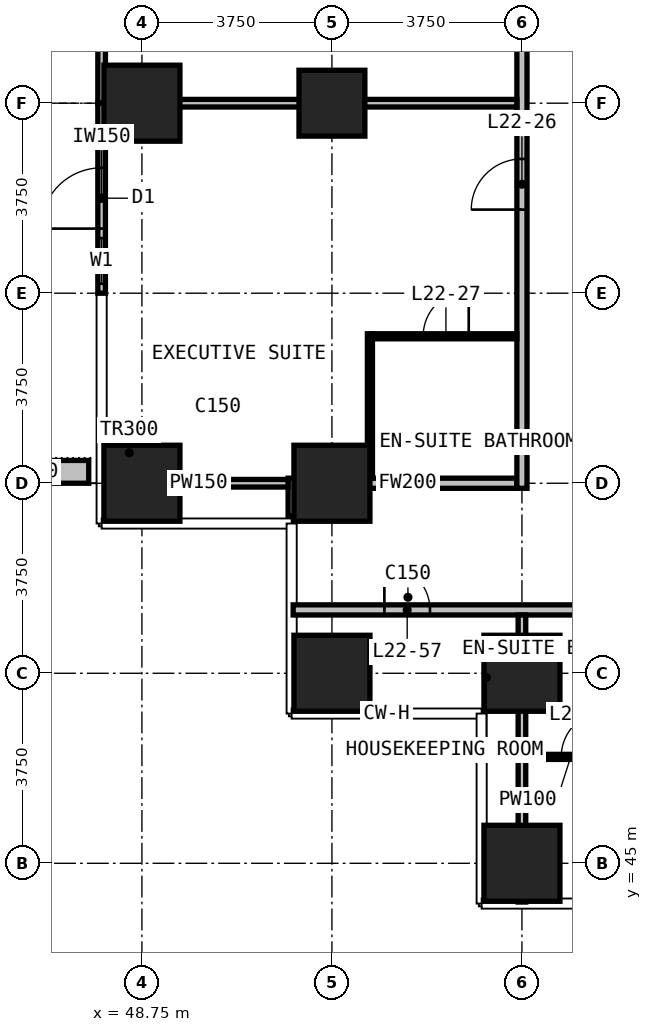
"""IFC4 building model, lengths in metres.
Left out: names, types, materials, properties, quantities, classifications, styles, units other than length and angle.
Written with IfcOpenShell. Run it as: python <this file> out.ifc"""

import sys

from ifc_helpers import new_model, si_unit, direction, frame, frame_2d, origin, origin_2d, place, context, subcontext, project, spatial, rectangle, extrude, element, fill, save


model = new_model("IFC4")
c1 = context("Model", 3, precision=1e-05, world=origin(), true_north=direction((0.0, 1.0)))
c2 = subcontext(c1, "Body", "Model", "MODEL_VIEW")
j1 = project(units=[si_unit("LENGTHUNIT", "METRE"), si_unit("PLANEANGLEUNIT", "RADIAN")], contexts=[c1])
p1 = place(None, origin())
s1 = spatial("IfcSite", under=j1, at=p1, CompositionType="ELEMENT")
p2 = place(p1, origin())
s2 = spatial("IfcBuilding", under=s1, at=p2, CompositionType="ELEMENT")
p3 = place(p2, frame((0.0, 0.0, 92.3)))
s3 = spatial("IfcBuildingStorey", under=s2, at=p3, CompositionType="ELEMENT", Elevation=92.3)
for number, where, z_axis, x_axis in (
    (1, (48.75, 52.5, 0.0), (0.0, 0.0, 1.0), (1.0, 0.0, 0.0)),
    (2, (48.75, 60.0, 0.0), (0.0, 0.0, 1.0), (1.0, 0.0, 0.0)),
    (3, (52.5, 48.75, 0.0), (0.0, 0.0, 1.0), (1.0, 0.0, 0.0)),
    (4, (52.5, 52.5, 0.0), (0.0, 0.0, 1.0), (1.0, 0.0, 0.0)),
):
    element("IfcColumn", number, at=place(p3, frame(where, z_axis=z_axis, x_axis=x_axis)), inside=s3, PredefinedType="COLUMN", context=c2, shape_type="SweptSolid", body=[
        extrude(rectangle(XDim=1.5, YDim=1.5, at=origin_2d()), origin(), (0.0, 0.0, 1.0), 3.3),
    ])
p4 = place(p3, frame((52.5, 60.0, 0.0), z_axis=(0.0, 0.0, 1.0), x_axis=(1.0, 0.0, 0.0)))
e5 = element("IfcColumn", 5, at=p4, inside=s3, PredefinedType="COLUMN", context=c2, shape_type="SweptSolid", body=[
    extrude(rectangle(XDim=1.3, YDim=1.3, at=origin_2d()), origin(), (0.0, 0.0, 1.0), 3.3),
])
for number, where, z_axis, x_axis in (
    (6, (56.25, 45.0, 0.0), (0.0, 0.0, 1.0), (1.0, 0.0, 0.0)),
    (7, (56.25, 48.75, 0.0), (0.0, 0.0, 1.0), (1.0, 0.0, 0.0)),
):
    element("IfcColumn", number, at=place(p3, frame(where, z_axis=z_axis, x_axis=x_axis)), inside=s3, PredefinedType="COLUMN", context=c2, shape_type="SweptSolid", body=[
        extrude(rectangle(XDim=1.5, YDim=1.5, at=origin_2d()), origin(), (0.0, 0.0, 1.0), 3.3),
    ])
p5 = place(p3, frame((47.955, 56.25, 0.0), z_axis=(0.0, 0.0, 1.0), x_axis=(0.0, 1.0, 0.0)))
e8 = element("IfcWall", 8, at=p5, inside=s3, PredefinedType="SOLIDWALL", context=c2, shape_type="SweptSolid", body=[
    extrude(rectangle(XDim=3.75, YDim=0.15, at=frame_2d((1.875, 0.0))), origin(), (0.0, 0.0, 1.0), 3.0),
])
p6 = place(p5, frame((0.188, 0.0, 0.1)))
e9 = element("IfcOpeningElement", 9, at=p6, cuts=e8, PredefinedType="OPENING", context=c2, shape_type="SweptSolid", body=[
    extrude(rectangle(XDim=0.9, YDim=2.4, at=frame_2d((0.45, 1.2))), frame((0.0, 0.085, 0.0), z_axis=(0.0, -1.0, 0.0), x_axis=(1.0, 0.0, 0.0)), (0.0, 0.0, 1.0), 0.17),
])
p7 = place(p5, frame((1.275, 0.0, 0.0)))
e10 = element("IfcOpeningElement", 10, at=p7, cuts=e8, PredefinedType="OPENING", context=c2, shape_type="SweptSolid", body=[
    extrude(rectangle(XDim=1.2, YDim=2.4, at=frame_2d((0.6, 1.2))), frame((0.0, 0.085, 0.0), z_axis=(0.0, -1.0, 0.0), x_axis=(1.0, 0.0, 0.0)), (0.0, 0.0, 1.0), 0.17),
])
p8 = place(p3, frame((47.955, 60.0, 0.0), z_axis=(0.0, 0.0, 1.0), x_axis=(0.0, 1.0, 0.0)))
e11 = element("IfcWall", 11, at=p8, inside=s3, PredefinedType="SOLIDWALL", context=c2, shape_type="SweptSolid", body=[
    extrude(rectangle(XDim=3.75, YDim=0.15, at=frame_2d((1.875, 0.0))), origin(), (0.0, 0.0, 1.0), 3.0),
])
p9 = place(p8, frame((1.275, 0.0, 0.0)))
e12 = element("IfcOpeningElement", 12, at=p9, cuts=e11, PredefinedType="OPENING", context=c2, shape_type="SweptSolid", body=[
    extrude(rectangle(XDim=1.2, YDim=2.4, at=frame_2d((0.6, 1.2))), frame((0.0, 0.085, 0.0), z_axis=(0.0, -1.0, 0.0), x_axis=(1.0, 0.0, 0.0)), (0.0, 0.0, 1.0), 0.17),
])
p10 = place(p8, frame((2.663, 0.0, 0.1)))
e13 = element("IfcOpeningElement", 13, at=p10, cuts=e11, PredefinedType="OPENING", context=c2, shape_type="SweptSolid", body=[
    extrude(rectangle(XDim=0.9, YDim=2.4, at=frame_2d((0.45, 1.2))), frame((0.0, 0.085, 0.0), z_axis=(0.0, -1.0, 0.0), x_axis=(1.0, 0.0, 0.0)), (0.0, 0.0, 1.0), 0.17),
])
p11 = place(p3, frame((47.7, 52.725, 0.0), z_axis=(0.0, 0.0, 1.0), x_axis=(-1.0, 0.0, 0.0)))
e14 = element("IfcWall", 14, at=p11, inside=s3, PredefinedType="USERDEFINED", context=c2, shape_type="SweptSolid", body=[
    extrude(rectangle(XDim=2.35, YDim=0.45, at=frame_2d((1.175, 0.0))), origin(), (0.0, 0.0, 1.0), 1.1),
])
p12 = place(p3, frame((51.735, 50.0, 0.0), z_axis=(0.0, 0.0, 1.0), x_axis=(1.0, 0.0, 0.0)))
e15 = element("IfcWall", 15, at=p12, inside=s3, PredefinedType="PARTITIONING", context=c2, shape_type="SweptSolid", body=[
    extrude(rectangle(XDim=46.53, YDim=0.2, at=frame_2d((23.265, 0.0))), origin(), (0.0, 0.0, 1.0), 3.0),
])
p13 = place(p12, frame((6.765, 0.0, 0.0)))
e16 = element("IfcOpeningElement", 16, at=p13, cuts=e15, PredefinedType="OPENING", context=c2, shape_type="SweptSolid", body=[
    extrude(rectangle(XDim=1.0, YDim=2.2, at=frame_2d((0.5, 1.1))), frame((0.0, 0.11, 0.0), z_axis=(0.0, -1.0, 0.0), x_axis=(1.0, 0.0, 0.0)), (0.0, 0.0, 1.0), 0.22),
])
p14 = place(p12, frame((10.515, 0.0, 0.0)))
e17 = element("IfcOpeningElement", 17, at=p14, cuts=e15, PredefinedType="OPENING", context=c2, shape_type="SweptSolid", body=[
    extrude(rectangle(XDim=1.0, YDim=2.2, at=frame_2d((0.5, 1.1))), frame((0.0, 0.11, 0.0), z_axis=(0.0, -1.0, 0.0), x_axis=(1.0, 0.0, 0.0)), (0.0, 0.0, 1.0), 0.22),
])
p15 = place(p12, frame((12.515, 0.0, 0.0)))
e18 = element("IfcOpeningElement", 18, at=p15, cuts=e15, PredefinedType="OPENING", context=c2, shape_type="SweptSolid", body=[
    extrude(rectangle(XDim=1.0, YDim=2.2, at=frame_2d((0.5, 1.1))), frame((0.0, 0.11, 0.0), z_axis=(0.0, -1.0, 0.0), x_axis=(1.0, 0.0, 0.0)), (0.0, 0.0, 1.0), 0.22),
])
p16 = place(p12, frame((18.015, 0.0, 0.0)))
e19 = element("IfcOpeningElement", 19, at=p16, cuts=e15, PredefinedType="OPENING", context=c2, shape_type="SweptSolid", body=[
    extrude(rectangle(XDim=1.0, YDim=2.2, at=frame_2d((0.5, 1.1))), frame((0.0, 0.11, 0.0), z_axis=(0.0, -1.0, 0.0), x_axis=(1.0, 0.0, 0.0)), (0.0, 0.0, 1.0), 0.22),
])
p17 = place(p12, frame((20.015, 0.0, 0.0)))
e20 = element("IfcOpeningElement", 20, at=p17, cuts=e15, PredefinedType="OPENING", context=c2, shape_type="SweptSolid", body=[
    extrude(rectangle(XDim=1.0, YDim=2.2, at=frame_2d((0.5, 1.1))), frame((0.0, 0.11, 0.0), z_axis=(0.0, -1.0, 0.0), x_axis=(1.0, 0.0, 0.0)), (0.0, 0.0, 1.0), 0.22),
])
p18 = place(p12, frame((25.515, 0.0, 0.0)))
e21 = element("IfcOpeningElement", 21, at=p18, cuts=e15, PredefinedType="OPENING", context=c2, shape_type="SweptSolid", body=[
    extrude(rectangle(XDim=1.0, YDim=2.2, at=frame_2d((0.5, 1.1))), frame((0.0, 0.11, 0.0), z_axis=(0.0, -1.0, 0.0), x_axis=(1.0, 0.0, 0.0)), (0.0, 0.0, 1.0), 0.22),
])
p19 = place(p12, frame((27.515, 0.0, 0.0)))
e22 = element("IfcOpeningElement", 22, at=p19, cuts=e15, PredefinedType="OPENING", context=c2, shape_type="SweptSolid", body=[
    extrude(rectangle(XDim=1.0, YDim=2.2, at=frame_2d((0.5, 1.1))), frame((0.0, 0.11, 0.0), z_axis=(0.0, -1.0, 0.0), x_axis=(1.0, 0.0, 0.0)), (0.0, 0.0, 1.0), 0.22),
])
p20 = place(p12, frame((33.015, 0.0, 0.0)))
e23 = element("IfcOpeningElement", 23, at=p20, cuts=e15, PredefinedType="OPENING", context=c2, shape_type="SweptSolid", body=[
    extrude(rectangle(XDim=1.0, YDim=2.2, at=frame_2d((0.5, 1.1))), frame((0.0, 0.11, 0.0), z_axis=(0.0, -1.0, 0.0), x_axis=(1.0, 0.0, 0.0)), (0.0, 0.0, 1.0), 0.22),
])
p21 = place(p12, frame((35.015, 0.0, 0.0)))
e24 = element("IfcOpeningElement", 24, at=p21, cuts=e15, PredefinedType="OPENING", context=c2, shape_type="SweptSolid", body=[
    extrude(rectangle(XDim=1.0, YDim=2.2, at=frame_2d((0.5, 1.1))), frame((0.0, 0.11, 0.0), z_axis=(0.0, -1.0, 0.0), x_axis=(1.0, 0.0, 0.0)), (0.0, 0.0, 1.0), 0.22),
])
p22 = place(p12, frame((38.765, 0.0, 0.0)))
e25 = element("IfcOpeningElement", 25, at=p22, cuts=e15, PredefinedType="OPENING", context=c2, shape_type="SweptSolid", body=[
    extrude(rectangle(XDim=1.0, YDim=2.2, at=frame_2d((0.5, 1.1))), frame((0.0, 0.11, 0.0), z_axis=(0.0, -1.0, 0.0), x_axis=(1.0, 0.0, 0.0)), (0.0, 0.0, 1.0), 0.22),
])
p23 = place(p12, frame((1.8, 0.0, 0.0)))
e26 = element("IfcOpeningElement", 26, at=p23, cuts=e15, PredefinedType="OPENING", context=c2, shape_type="SweptSolid", body=[
    extrude(rectangle(XDim=0.9, YDim=2.2, at=frame_2d((0.45, 1.1))), frame((0.0, 0.11, 0.0), z_axis=(0.0, -1.0, 0.0), x_axis=(1.0, 0.0, 0.0)), (0.0, 0.0, 1.0), 0.22),
])
p24 = place(p12, frame((43.815, 0.0, 0.0)))
e27 = element("IfcOpeningElement", 27, at=p24, cuts=e15, PredefinedType="OPENING", context=c2, shape_type="SweptSolid", body=[
    extrude(rectangle(XDim=0.9, YDim=2.2, at=frame_2d((0.45, 1.1))), frame((0.0, 0.11, 0.0), z_axis=(0.0, -1.0, 0.0), x_axis=(1.0, 0.0, 0.0)), (0.0, 0.0, 1.0), 0.22),
])
p25 = place(p3, frame((51.835, 52.5, 0.0), z_axis=(0.0, 0.0, 1.0), x_axis=(1.0, 0.0, 0.0)))
e28 = element("IfcWall", 28, at=p25, inside=s3, PredefinedType="PARTITIONING", context=c2, shape_type="SweptSolid", body=[
    extrude(rectangle(XDim=4.315, YDim=0.2, at=frame_2d((2.157, 0.0))), origin(), (0.0, 0.0, 1.0), 3.0),
])
p26 = place(p3, frame((51.735, 51.855, 0.0), z_axis=(0.0, 0.0, 1.0), x_axis=(0.0, 1.0, 0.0)))
e29 = element("IfcWall", 29, at=p26, inside=s3, PredefinedType="PARTITIONING", context=c2, shape_type="SweptSolid", body=[
    extrude(rectangle(XDim=0.745, YDim=0.2, at=frame_2d((0.373, 0.0))), origin(), (0.0, 0.0, 1.0), 3.0),
])
p27 = place(p3, frame((56.25, 52.4, 0.0), z_axis=(0.0, 0.0, 1.0), x_axis=(0.0, 1.0, 0.0)))
e30 = element("IfcWall", 30, at=p27, inside=s3, PredefinedType="PARTITIONING", context=c2, shape_type="SweptSolid", body=[
    extrude(rectangle(XDim=37.675, YDim=0.2, at=frame_2d((18.837, 0.0))), origin(), (0.0, 0.0, 1.0), 3.0),
])
p28 = place(p27, frame((5.5, 0.0, 0.0)))
e31 = element("IfcOpeningElement", 31, at=p28, cuts=e30, PredefinedType="OPENING", context=c2, shape_type="SweptSolid", body=[
    extrude(rectangle(XDim=1.0, YDim=2.2, at=frame_2d((0.5, 1.1))), frame((0.0, 0.11, 0.0), z_axis=(0.0, -1.0, 0.0), x_axis=(1.0, 0.0, 0.0)), (0.0, 0.0, 1.0), 0.22),
])
p29 = place(p27, frame((8.7, 0.0, 0.0)))
e32 = element("IfcOpeningElement", 32, at=p29, cuts=e30, PredefinedType="OPENING", context=c2, shape_type="SweptSolid", body=[
    extrude(rectangle(XDim=1.0, YDim=2.2, at=frame_2d((0.5, 1.1))), frame((0.0, 0.11, 0.0), z_axis=(0.0, -1.0, 0.0), x_axis=(1.0, 0.0, 0.0)), (0.0, 0.0, 1.0), 0.22),
])
p30 = place(p27, frame((20.5, 0.0, 0.0)))
e33 = element("IfcOpeningElement", 33, at=p30, cuts=e30, PredefinedType="OPENING", context=c2, shape_type="SweptSolid", body=[
    extrude(rectangle(XDim=1.0, YDim=2.2, at=frame_2d((0.5, 1.1))), frame((0.0, 0.11, 0.0), z_axis=(0.0, -1.0, 0.0), x_axis=(1.0, 0.0, 0.0)), (0.0, 0.0, 1.0), 0.22),
])
p31 = place(p27, frame((23.7, 0.0, 0.0)))
e34 = element("IfcOpeningElement", 34, at=p31, cuts=e30, PredefinedType="OPENING", context=c2, shape_type="SweptSolid", body=[
    extrude(rectangle(XDim=1.0, YDim=2.2, at=frame_2d((0.5, 1.1))), frame((0.0, 0.11, 0.0), z_axis=(0.0, -1.0, 0.0), x_axis=(1.0, 0.0, 0.0)), (0.0, 0.0, 1.0), 0.22),
])
p32 = place(p27, frame((35.5, 0.0, 0.0)))
e35 = element("IfcOpeningElement", 35, at=p32, cuts=e30, PredefinedType="OPENING", context=c2, shape_type="SweptSolid", body=[
    extrude(rectangle(XDim=1.0, YDim=2.2, at=frame_2d((0.5, 1.1))), frame((0.0, 0.11, 0.0), z_axis=(0.0, -1.0, 0.0), x_axis=(1.0, 0.0, 0.0)), (0.0, 0.0, 1.0), 0.22),
])
p33 = place(p3, frame((48.105, 52.5, 0.0), z_axis=(0.0, 0.0, 1.0), x_axis=(1.0, 0.0, 0.0)))
e36 = element("IfcWall", 36, at=p33, inside=s3, PredefinedType="PARTITIONING", context=c2, shape_type="SweptSolid", body=[
    extrude(rectangle(XDim=3.53, YDim=0.15, at=frame_2d((1.765, 0.0))), origin(), (0.0, 0.0, 1.0), 3.0),
])
p34 = place(p3, frame((48.04, 60.0, 0.0), z_axis=(0.0, 0.0, 1.0), x_axis=(1.0, 0.0, 0.0)))
e37 = element("IfcWall", 37, at=p34, inside=s3, PredefinedType="PARTITIONING", context=c2, shape_type="SweptSolid", body=[
    extrude(rectangle(XDim=8.11, YDim=0.15, at=frame_2d((4.055, 0.0))), origin(), (0.0, 0.0, 1.0), 3.0),
])
p35 = place(p3, frame((56.25, 44.235, 0.0), z_axis=(0.0, 0.0, 1.0), x_axis=(0.0, 1.0, 0.0)))
e38 = element("IfcWall", 38, at=p35, inside=s3, PredefinedType="PARTITIONING", context=c2, shape_type="SweptSolid", body=[
    extrude(rectangle(XDim=5.665, YDim=0.15, at=frame_2d((2.833, 0.0))), origin(), (0.0, 0.0, 1.0), 3.0),
])
p36 = place(p3, frame((56.325, 47.1, 0.0), z_axis=(0.0, 0.0, 1.0), x_axis=(1.0, 0.0, 0.0)))
e39 = element("IfcWall", 39, at=p36, inside=s3, PredefinedType="PARTITIONING", context=c2, shape_type="SweptSolid", body=[
    extrude(rectangle(XDim=1.775, YDim=0.1, at=frame_2d((0.888, 0.0))), origin(), (0.0, 0.0, 1.0), 3.0),
])
p37 = place(p36, frame((0.7, 0.0, 0.0)))
e40 = element("IfcOpeningElement", 40, at=p37, cuts=e39, PredefinedType="OPENING", context=c2, shape_type="SweptSolid", body=[
    extrude(rectangle(XDim=0.9, YDim=2.2, at=frame_2d((0.45, 1.1))), frame((0.0, 0.06, 0.0), z_axis=(0.0, -1.0, 0.0), x_axis=(1.0, 0.0, 0.0)), (0.0, 0.0, 1.0), 0.12),
])
p38 = place(p3, frame((53.3, 55.4, 0.0), z_axis=(0.0, 0.0, 1.0), x_axis=(1.0, 0.0, 0.0)))
e41 = element("IfcWall", 41, at=p38, inside=s3, PredefinedType="PARTITIONING", context=c2, shape_type="SweptSolid", body=[
    extrude(rectangle(XDim=2.85, YDim=0.1, at=frame_2d((1.425, 0.0))), origin(), (0.0, 0.0, 1.0), 3.0),
])
p39 = place(p38, frame((1.0, 0.0, 0.0)))
e42 = element("IfcOpeningElement", 42, at=p39, cuts=e41, PredefinedType="OPENING", context=c2, shape_type="SweptSolid", body=[
    extrude(rectangle(XDim=0.9, YDim=2.2, at=frame_2d((0.45, 1.1))), frame((0.0, 0.06, 0.0), z_axis=(0.0, -1.0, 0.0), x_axis=(1.0, 0.0, 0.0)), (0.0, 0.0, 1.0), 0.12),
])
p40 = place(p3, frame((53.25, 52.6, 0.0), z_axis=(0.0, 0.0, 1.0), x_axis=(0.0, 1.0, 0.0)))
e43 = element("IfcWall", 43, at=p40, inside=s3, PredefinedType="PARTITIONING", context=c2, shape_type="SweptSolid", body=[
    extrude(rectangle(XDim=2.85, YDim=0.1, at=frame_2d((1.425, 0.0))), origin(), (0.0, 0.0, 1.0), 3.0),
])
p41 = place(p6, origin())
e44 = element("IfcWindow", 44, at=p41, inside=s3, PartitioningType="SINGLE_PANEL", PredefinedType="WINDOW", context=c2, shape_type="SweptSolid", body=[
    extrude(rectangle(XDim=0.9, YDim=2.4, at=frame_2d((0.45, 1.2))), frame((0.0, 0.03, 0.0), z_axis=(0.0, -1.0, 0.0), x_axis=(1.0, 0.0, 0.0)), (0.0, 0.0, 1.0), 0.06),
])
fill(e9, e44)
p42 = place(p7, origin())
e45 = element("IfcDoor", 45, at=p42, inside=s3, OperationType="SINGLE_SWING_LEFT", PredefinedType="DOOR", context=c2, shape_type="SweptSolid", body=[
    extrude(rectangle(XDim=1.2, YDim=2.4, at=frame_2d((0.6, 1.2))), frame((0.0, 0.025, 0.0), z_axis=(0.0, -1.0, 0.0), x_axis=(1.0, 0.0, 0.0)), (0.0, 0.0, 1.0), 0.05),
])
fill(e10, e45)
p43 = place(p37, origin())
e46 = element("IfcDoor", 46, at=p43, inside=s3, OperationType="SINGLE_SWING_RIGHT", PredefinedType="DOOR", context=c2, shape_type="SweptSolid", body=[
    extrude(rectangle(XDim=0.9, YDim=2.2, at=frame_2d((0.45, 1.1))), frame((0.0, 0.025, 0.0), z_axis=(0.0, -1.0, 0.0), x_axis=(1.0, 0.0, 0.0)), (0.0, 0.0, 1.0), 0.05),
])
fill(e40, e46)
p44 = place(p28, origin())
e47 = element("IfcDoor", 47, at=p44, inside=s3, OperationType="SINGLE_SWING_LEFT", PredefinedType="DOOR", context=c2, shape_type="SweptSolid", body=[
    extrude(rectangle(XDim=1.0, YDim=2.2, at=frame_2d((0.5, 1.1))), frame((0.0, 0.025, 0.0), z_axis=(0.0, -1.0, 0.0), x_axis=(1.0, 0.0, 0.0)), (0.0, 0.0, 1.0), 0.05),
])
fill(e31, e47)
p45 = place(p39, origin())
e48 = element("IfcDoor", 48, at=p45, inside=s3, OperationType="SINGLE_SWING_RIGHT", PredefinedType="DOOR", context=c2, shape_type="SweptSolid", body=[
    extrude(rectangle(XDim=0.9, YDim=2.2, at=frame_2d((0.45, 1.1))), frame((0.0, 0.025, 0.0), z_axis=(0.0, -1.0, 0.0), x_axis=(1.0, 0.0, 0.0)), (0.0, 0.0, 1.0), 0.05),
])
fill(e42, e48)
p46 = place(p23, origin())
e49 = element("IfcDoor", 49, at=p46, inside=s3, OperationType="SINGLE_SWING_RIGHT", PredefinedType="DOOR", context=c2, shape_type="SweptSolid", body=[
    extrude(rectangle(XDim=0.9, YDim=2.2, at=frame_2d((0.45, 1.1))), frame((0.0, 0.025, 0.0), z_axis=(0.0, -1.0, 0.0), x_axis=(1.0, 0.0, 0.0)), (0.0, 0.0, 1.0), 0.05),
])
fill(e26, e49)
save(model, sys.argv[1])
